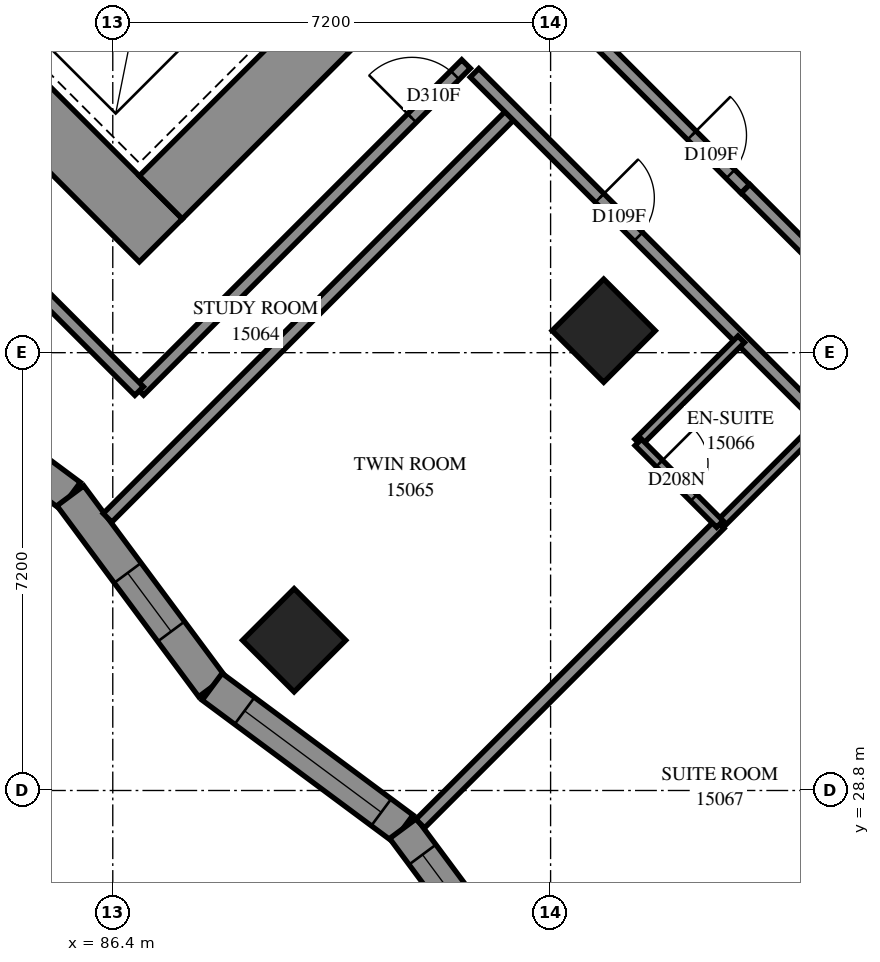
"""IFC4 building model, lengths in metres.
Left out: names, types, materials, properties, quantities, classifications, styles, units other than length and angle.
Written with IfcOpenShell. Run it as: python <this file> out.ifc"""

import sys

from ifc_helpers import new_model, si_unit, direction, frame, frame_2d, origin, origin_2d, place, context, subcontext, project, spatial, polyline, rectangle, outline, extrude, element, fill, save


model = new_model("IFC4")
c1 = context("Model", 3, precision=1e-05, world=origin(), true_north=direction((0.0, 1.0)))
c2 = subcontext(c1, "Body", "Model", "MODEL_VIEW")
j1 = project(units=[si_unit("LENGTHUNIT", "METRE"), si_unit("PLANEANGLEUNIT", "RADIAN")], contexts=[c1])
p1 = place(None, origin())
s1 = spatial("IfcSite", under=j1, at=p1, CompositionType="ELEMENT")
p2 = place(p1, origin())
s2 = spatial("IfcBuilding", under=s1, at=p2, CompositionType="ELEMENT")
p3 = place(p2, frame((0.0, 0.0, 57.6)))
s3 = spatial("IfcBuildingStorey", under=s2, at=p3, CompositionType="ELEMENT", Elevation=57.6)
for number, where, z_axis, x_axis in (
    (1, (94.474, 36.362, 0.0), (0.0, 0.0, 1.0), (0.707, -0.707, 0.0)),
    (2, (89.382, 31.271, 0.0), (0.0, 0.0, 1.0), (0.707, -0.707, 0.0)),
):
    element("IfcColumn", number, at=place(p3, frame(where, z_axis=z_axis, x_axis=x_axis)), inside=s3, PredefinedType="COLUMN", context=c2, shape_type="SweptSolid", body=[
        extrude(rectangle(XDim=1.2, YDim=1.2, at=origin_2d()), origin(), (0.0, 0.0, 1.0), 3.1),
    ])
p4 = place(p3, frame((75.594, 49.443, -0.3), z_axis=(0.0, 0.0, 1.0), x_axis=(0.7071037324, -0.70710983, 0.0)))
e3 = element("IfcWall", 3, at=p4, inside=s3, PredefinedType="SHEAR", context=c2, shape_type="SweptSolid", body=[
    extrude(rectangle(XDim=16.4, YDim=1.0, at=frame_2d((8.2, 0.0))), origin(), (0.0, 0.0, 1.0), 2.7),
])
p5 = place(p3, frame((87.19, 38.554, -0.3), z_axis=(0.0, 0.0, 1.0), x_axis=(0.707103309, 0.7071102534, 0.0)))
e4 = element("IfcWall", 4, at=p5, inside=s3, PredefinedType="SHEAR", context=c2, shape_type="SweptSolid", body=[
    extrude(rectangle(XDim=14.4, YDim=1.0, at=frame_2d((7.2, 0.0))), origin(), (0.0, 0.0, 1.0), 2.7),
])
p6 = place(p5, frame((4.55, 0.0, 0.3)))
e5 = element("IfcOpeningElement", 5, at=p6, cuts=e4, PredefinedType="OPENING", context=c2, shape_type="SweptSolid", body=[
    extrude(rectangle(XDim=1.1, YDim=2.1, at=frame_2d((0.55, 1.05))), frame((0.0, 0.51, 0.0), z_axis=(0.0, -1.0, 0.0), x_axis=(1.0, 0.0, 0.0)), (0.0, 0.0, 1.0), 1.02),
])
p7 = place(p5, frame((11.35, 0.0, 0.3)))
e6 = element("IfcOpeningElement", 6, at=p7, cuts=e4, PredefinedType="OPENING", context=c2, shape_type="SweptSolid", body=[
    extrude(rectangle(XDim=1.1, YDim=2.1, at=frame_2d((0.55, 1.05))), frame((0.0, 0.51, 0.0), z_axis=(0.0, -1.0, 0.0), x_axis=(1.0, 0.0, 0.0)), (0.0, 0.0, 1.0), 1.02),
])
p8 = place(p3, frame((82.563, 35.977, 0.0), z_axis=(0.0, 0.0, 1.0), x_axis=(0.8029207709, -0.596085762, 0.0)))
e7 = element("IfcWall", 7, at=p8, inside=s3, PredefinedType="SOLIDWALL", context=c2, shape_type="SweptSolid", body=[
    extrude(outline(polyline([(-0.041, -0.275), (3.87, -0.275), (3.951, 0.275), (0.041, 0.275), (-0.041, -0.275)])), origin(), (0.0, 0.0, 1.0), 3.1),
])
p9 = place(p8, frame((1.736, 0.0, 0.5)))
e8 = element("IfcOpeningElement", 8, at=p9, cuts=e7, PredefinedType="OPENING", context=c2, shape_type="SweptSolid", body=[
    extrude(rectangle(XDim=1.2, YDim=2.45, at=frame_2d((0.6, 1.225))), frame((0.0, 0.285, 0.0), z_axis=(0.0, -1.0, 0.0), x_axis=(1.0, 0.0, 0.0)), (0.0, 0.0, 1.0), 0.57),
])
p10 = place(p3, frame((85.703, 33.646, 0.0), z_axis=(0.0, 0.0, 1.0), x_axis=(0.596085762, -0.8029207709, 0.0)))
e9 = element("IfcWall", 9, at=p10, inside=s3, PredefinedType="SOLIDWALL", context=c2, shape_type="SweptSolid", body=[
    extrude(outline(polyline([(0.041, -0.275), (3.951, -0.275), (3.87, 0.275), (-0.041, 0.275), (0.041, -0.275)])), origin(), (0.0, 0.0, 1.0), 3.1),
])
p11 = place(p10, frame((1.58, 0.0, 0.5)))
e10 = element("IfcOpeningElement", 10, at=p11, cuts=e9, PredefinedType="OPENING", context=c2, shape_type="SweptSolid", body=[
    extrude(rectangle(XDim=1.2, YDim=2.45, at=frame_2d((0.6, 1.225))), frame((0.0, 0.285, 0.0), z_axis=(0.0, -1.0, 0.0), x_axis=(1.0, 0.0, 0.0)), (0.0, 0.0, 1.0), 0.57),
])
p12 = place(p3, frame((88.034, 30.506, 0.0), z_axis=(0.0, 0.0, 1.0), x_axis=(0.8029298561, -0.5960735241, 0.0)))
e11 = element("IfcWall", 11, at=p12, inside=s3, PredefinedType="SOLIDWALL", context=c2, shape_type="SweptSolid", body=[
    extrude(outline(polyline([(-0.041, -0.275), (3.87, -0.275), (3.951, 0.275), (0.041, 0.275), (-0.041, -0.275)])), origin(), (0.0, 0.0, 1.0), 3.1),
])
p13 = place(p12, frame((0.664, 0.0, 0.5)))
e12 = element("IfcOpeningElement", 12, at=p13, cuts=e11, PredefinedType="OPENING", context=c2, shape_type="SweptSolid", body=[
    extrude(rectangle(XDim=2.8, YDim=2.45, at=frame_2d((1.4, 1.225))), frame((0.0, 0.285, 0.0), z_axis=(0.0, -1.0, 0.0), x_axis=(1.0, 0.0, 0.0)), (0.0, 0.0, 1.0), 0.57),
])
p14 = place(p3, frame((91.174, 28.175, 0.0), z_axis=(0.0, 0.0, 1.0), x_axis=(0.5960692771, -0.8029330089, 0.0)))
e13 = element("IfcWall", 13, at=p14, inside=s3, PredefinedType="SOLIDWALL", context=c2, shape_type="SweptSolid", body=[
    extrude(outline(polyline([(0.041, -0.275), (3.951, -0.275), (3.87, 0.275), (-0.041, 0.275), (0.041, -0.275)])), origin(), (0.0, 0.0, 1.0), 3.1),
])
p15 = place(p14, frame((0.535, 0.0, 0.5)))
e14 = element("IfcOpeningElement", 14, at=p15, cuts=e13, PredefinedType="OPENING", context=c2, shape_type="SweptSolid", body=[
    extrude(rectangle(XDim=2.8, YDim=2.45, at=frame_2d((1.4, 1.225))), frame((0.0, 0.285, 0.0), z_axis=(0.0, -1.0, 0.0), x_axis=(1.0, 0.0, 0.0)), (0.0, 0.0, 1.0), 0.57),
])
p16 = place(p3, frame((86.314, 33.285, 0.0), z_axis=(0.0, 0.0, 1.0), x_axis=(0.7069956063, 0.7072179386, 0.0)))
e15 = element("IfcWall", 15, at=p16, inside=s3, PredefinedType="PARTITIONING", context=c2, shape_type="SweptSolid", body=[
    extrude(rectangle(XDim=9.445, YDim=0.2, at=frame_2d((4.723, 0.0))), origin(), (0.0, 0.0, 1.0), 3.1),
])
p17 = place(p3, frame((92.349, 40.601, 0.0), z_axis=(0.0, 0.0, 1.0), x_axis=(0.7071067812, -0.7071067812, 0.0)))
e16 = element("IfcWall", 16, at=p17, inside=s3, PredefinedType="PARTITIONING", context=c2, shape_type="SweptSolid", body=[
    extrude(rectangle(XDim=8.101, YDim=0.2, at=frame_2d((4.05, 0.0))), origin(), (0.0, 0.0, 1.0), 3.1),
])
p18 = place(p17, frame((2.909, 0.0, 0.0)))
e17 = element("IfcOpeningElement", 17, at=p18, cuts=e16, PredefinedType="OPENING", context=c2, shape_type="SweptSolid", body=[
    extrude(rectangle(XDim=0.9, YDim=2.1, at=frame_2d((0.45, 1.05))), frame((0.0, 0.11, 0.0), z_axis=(0.0, -1.0, 0.0), x_axis=(1.0, 0.0, 0.0)), (0.0, 0.0, 1.0), 0.22),
])
p19 = place(p3, frame((86.836, 35.372, 0.0), z_axis=(0.0, 0.0, 1.0), x_axis=(0.7071067812, 0.7071067812, 0.0)))
e18 = element("IfcWall", 18, at=p19, inside=s3, PredefinedType="PARTITIONING", context=c2, shape_type="SweptSolid", body=[
    extrude(rectangle(XDim=7.6, YDim=0.2, at=frame_2d((3.8, 0.0))), origin(), (0.0, 0.0, 1.0), 3.1),
])
p20 = place(p19, frame((6.342, 0.0, 0.0)))
e19 = element("IfcOpeningElement", 19, at=p20, cuts=e18, PredefinedType="OPENING", context=c2, shape_type="SweptSolid", body=[
    extrude(rectangle(XDim=1.0, YDim=2.1, at=frame_2d((0.5, 1.05))), frame((0.0, 0.11, 0.0), z_axis=(0.0, -1.0, 0.0), x_axis=(1.0, 0.0, 0.0)), (0.0, 0.0, 1.0), 0.22),
])
p21 = place(p3, frame((96.522, 23.138, 0.0), z_axis=(0.0, 0.0, 1.0), x_axis=(0.707113922, 0.7070996403, 0.0)))
e20 = element("IfcWall", 20, at=p21, inside=s3, PredefinedType="PARTITIONING", context=c2, shape_type="SweptSolid", body=[
    extrude(rectangle(XDim=7.002, YDim=0.2, at=frame_2d((3.501, 0.0))), origin(), (0.0, 0.0, 1.0), 3.1),
])
p22 = place(p3, frame((91.457, 28.256, 0.0), z_axis=(0.0, 0.0, 1.0), x_axis=(0.7071067812, 0.7071067812, 0.0)))
e21 = element("IfcWall", 21, at=p22, inside=s3, PredefinedType="PARTITIONING", context=c2, shape_type="SweptSolid", body=[
    extrude(rectangle(XDim=6.965, YDim=0.2, at=frame_2d((3.482, 0.0))), origin(), (0.0, 0.0, 1.0), 3.1),
])
p23 = place(p3, frame((93.481, 42.015, 0.0), z_axis=(0.0, 0.0, 1.0), x_axis=(0.7071067812, -0.7071067812, 0.0)))
e22 = element("IfcWall", 22, at=p23, inside=s3, PredefinedType="PARTITIONING", context=c2, shape_type="SweptSolid", body=[
    extrude(rectangle(XDim=4.698, YDim=0.2, at=frame_2d((2.349, 0.0))), origin(), (0.0, 0.0, 1.0), 3.1),
])
p24 = place(p23, frame((3.452, 0.0, 0.0)))
e23 = element("IfcOpeningElement", 23, at=p24, cuts=e22, PredefinedType="OPENING", context=c2, shape_type="SweptSolid", body=[
    extrude(rectangle(XDim=0.9, YDim=2.1, at=frame_2d((0.45, 1.05))), frame((0.0, 0.11, 0.0), z_axis=(0.0, -1.0, 0.0), x_axis=(1.0, 0.0, 0.0)), (0.0, 0.0, 1.0), 0.22),
])
p25 = place(p3, frame((85.065, 37.137, 0.0), z_axis=(0.0, 0.0, 1.0), x_axis=(0.7071067812, -0.7071067812, 0.0)))
e24 = element("IfcWall", 24, at=p25, inside=s3, PredefinedType="PARTITIONING", context=c2, shape_type="SweptSolid", body=[
    extrude(rectangle(XDim=2.5, YDim=0.2, at=frame_2d((1.25, 0.0))), origin(), (0.0, 0.0, 1.0), 3.1),
])
p26 = place(p3, frame((96.384, 33.178, 0.0), z_axis=(0.0, 0.0, 1.0), x_axis=(0.7075233388, 0.706689978, 0.0)))
e25 = element("IfcWall", 25, at=p26, inside=s3, PredefinedType="PARTITIONING", context=c2, shape_type="SweptSolid", body=[
    extrude(rectangle(XDim=2.4, YDim=0.15, at=frame_2d((1.2, 0.0))), origin(), (0.0, 0.0, 1.0), 3.1),
])
p27 = place(p3, frame((95.039, 34.525, 0.0), z_axis=(0.0, 0.0, 1.0), x_axis=(0.7071067812, 0.7071067812, 0.0)))
e26 = element("IfcWall", 26, at=p27, inside=s3, PredefinedType="PARTITIONING", context=c2, shape_type="SweptSolid", body=[
    extrude(rectangle(XDim=2.398, YDim=0.15, at=frame_2d((1.199, 0.0))), origin(), (0.0, 0.0, 1.0), 3.1),
])
p28 = place(p3, frame((95.042, 34.526, 0.0), z_axis=(0.0, 0.0, 1.0), x_axis=(0.7065800724, -0.7076330979, 0.0)))
e27 = element("IfcWall", 27, at=p28, inside=s3, PredefinedType="PARTITIONING", context=c2, shape_type="SweptSolid", body=[
    extrude(rectangle(XDim=1.899, YDim=0.15, at=frame_2d((0.95, 0.0))), origin(), (0.0, 0.0, 1.0), 3.1),
])
p29 = place(p28, frame((0.491, 0.0, 0.0)))
e28 = element("IfcOpeningElement", 28, at=p29, cuts=e27, PredefinedType="OPENING", context=c2, shape_type="SweptSolid", body=[
    extrude(rectangle(XDim=0.8, YDim=2.1, at=frame_2d((0.4, 1.05))), frame((0.0, 0.085, 0.0), z_axis=(0.0, -1.0, 0.0), x_axis=(1.0, 0.0, 0.0)), (0.0, 0.0, 1.0), 0.17),
])
p30 = place(p3, frame((96.806, 38.696, 0.0), z_axis=(0.0, 0.0, 1.0), x_axis=(0.7076943229, -0.7065187509, 0.0)))
e29 = element("IfcWall", 29, at=p30, inside=s3, PredefinedType="PARTITIONING", context=c2, shape_type="SweptSolid", body=[
    extrude(rectangle(XDim=1.701, YDim=0.2, at=frame_2d((0.851, 0.0))), origin(), (0.0, 0.0, 1.0), 3.1),
])
p31 = place(p11, origin())
e30 = element("IfcWindow", 30, at=p31, inside=s3, PartitioningType="SINGLE_PANEL", PredefinedType="WINDOW", context=c2, shape_type="SweptSolid", body=[
    extrude(rectangle(XDim=1.2, YDim=2.45, at=frame_2d((0.6, 1.225))), frame((0.0, 0.155, 0.0), z_axis=(0.0, -1.0, 0.0), x_axis=(1.0, 0.0, 0.0)), (0.0, 0.0, 1.0), 0.06),
])
fill(e10, e30)
p32 = place(p13, origin())
e31 = element("IfcWindow", 31, at=p32, inside=s3, PartitioningType="SINGLE_PANEL", PredefinedType="WINDOW", context=c2, shape_type="SweptSolid", body=[
    extrude(rectangle(XDim=2.8, YDim=2.45, at=frame_2d((1.4, 1.225))), frame((0.0, 0.155, 0.0), z_axis=(0.0, -1.0, 0.0), x_axis=(1.0, 0.0, 0.0)), (0.0, 0.0, 1.0), 0.06),
])
fill(e12, e31)
p33 = place(p15, origin())
e32 = element("IfcWindow", 32, at=p33, inside=s3, PartitioningType="SINGLE_PANEL", PredefinedType="WINDOW", context=c2, shape_type="SweptSolid", body=[
    extrude(rectangle(XDim=2.8, YDim=2.45, at=frame_2d((1.4, 1.225))), frame((0.0, 0.155, 0.0), z_axis=(0.0, -1.0, 0.0), x_axis=(1.0, 0.0, 0.0)), (0.0, 0.0, 1.0), 0.06),
])
fill(e14, e32)
p34 = place(p24, origin())
e33 = element("IfcDoor", 33, at=p34, inside=s3, OperationType="SINGLE_SWING_RIGHT", PredefinedType="DOOR", context=c2, shape_type="SweptSolid", body=[
    extrude(rectangle(XDim=0.9, YDim=2.1, at=frame_2d((0.45, 1.05))), frame((0.0, 0.025, 0.0), z_axis=(0.0, -1.0, 0.0), x_axis=(1.0, 0.0, 0.0)), (0.0, 0.0, 1.0), 0.05),
])
fill(e23, e33)
p35 = place(p20, origin())
e34 = element("IfcDoor", 34, at=p35, inside=s3, OperationType="SINGLE_SWING_RIGHT", PredefinedType="DOOR", context=c2, shape_type="SweptSolid", body=[
    extrude(rectangle(XDim=1.0, YDim=2.1, at=frame_2d((0.5, 1.05))), frame((0.0, 0.025, 0.0), z_axis=(0.0, -1.0, 0.0), x_axis=(1.0, 0.0, 0.0)), (0.0, 0.0, 1.0), 0.05),
])
fill(e19, e34)
p36 = place(p18, origin())
e35 = element("IfcDoor", 35, at=p36, inside=s3, OperationType="SINGLE_SWING_LEFT", PredefinedType="DOOR", context=c2, shape_type="SweptSolid", body=[
    extrude(rectangle(XDim=0.9, YDim=2.1, at=frame_2d((0.45, 1.05))), frame((0.0, 0.025, 0.0), z_axis=(0.0, -1.0, 0.0), x_axis=(1.0, 0.0, 0.0)), (0.0, 0.0, 1.0), 0.05),
])
fill(e17, e35)
p37 = place(p29, origin())
e36 = element("IfcDoor", 36, at=p37, inside=s3, OperationType="SINGLE_SWING_RIGHT", PredefinedType="DOOR", context=c2, shape_type="SweptSolid", body=[
    extrude(rectangle(XDim=0.8, YDim=2.1, at=frame_2d((0.4, 1.05))), frame((0.0, 0.025, 0.0), z_axis=(0.0, -1.0, 0.0), x_axis=(1.0, 0.0, 0.0)), (0.0, 0.0, 1.0), 0.05),
])
fill(e28, e36)
save(model, sys.argv[1])
